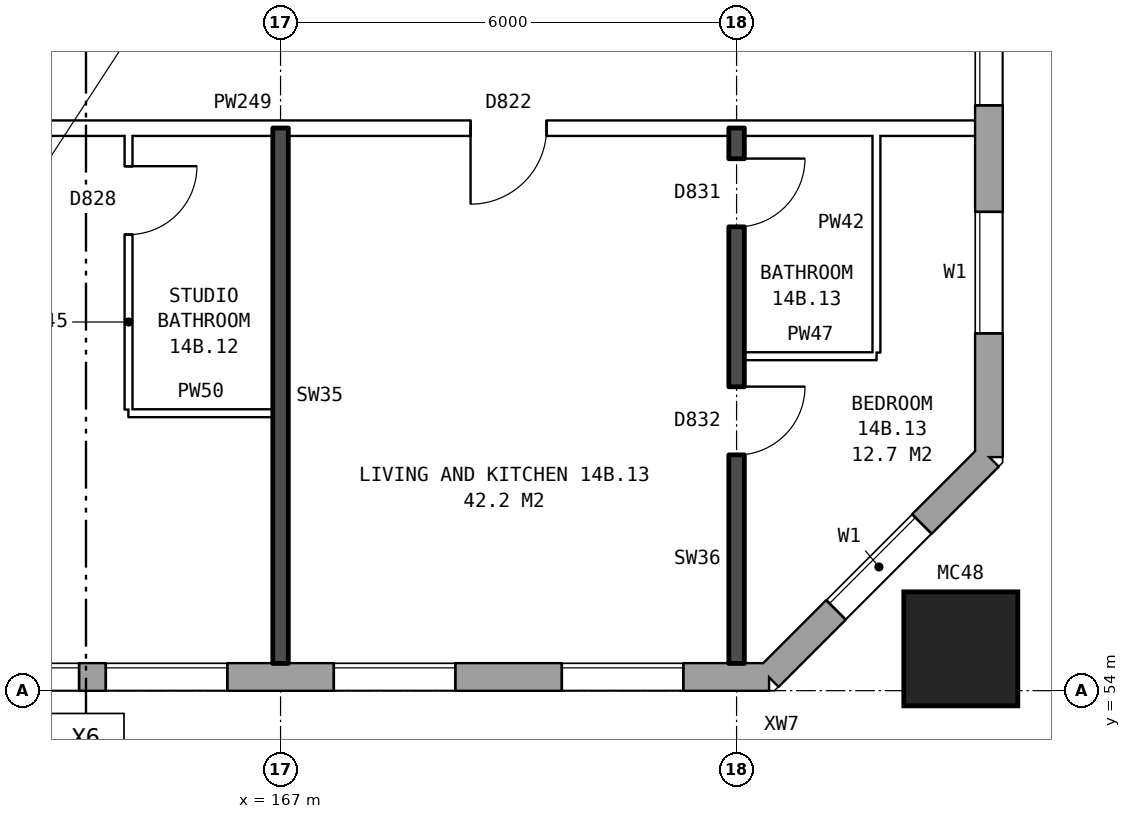
"""IFC4 building model, lengths in metres.
Left out: names, types, materials, properties, quantities, classifications, styles, units other than length and angle.
Written with IfcOpenShell. Run it as: python <this file> out.ifc"""

import sys

from ifc_helpers import new_model, si_unit, direction, frame, frame_2d, origin, origin_2d, place, context, subcontext, project, spatial, rectangle, hollow_rectangle, extrude, element, fill, save


model = new_model("IFC4")
c1 = context("Model", 3, precision=1e-05, world=origin(), true_north=direction((0.0, 1.0)))
c2 = subcontext(c1, "Body", "Model", "MODEL_VIEW")
j1 = project(units=[si_unit("LENGTHUNIT", "METRE"), si_unit("PLANEANGLEUNIT", "RADIAN")], contexts=[c1])
p1 = place(None, origin())
s1 = spatial("IfcSite", under=j1, at=p1, CompositionType="ELEMENT")
p2 = place(p1, origin())
s2 = spatial("IfcBuilding", under=s1, at=p2, CompositionType="ELEMENT")
p3 = place(p2, frame((0.0, 0.0, 53.6)))
s3 = spatial("IfcBuildingStorey", under=s2, at=p3, CompositionType="ELEMENT", Elevation=53.6)
p4 = place(p3, frame((175.95, 54.55, 0.0), z_axis=(0.0, 0.0, 1.0), x_axis=(1.0, 0.0, 0.0)))
e1 = element("IfcColumn", 1, at=p4, inside=s3, PredefinedType="COLUMN", context=c2, shape_type="SweptSolid", body=[
    extrude(hollow_rectangle(XDim=1.5, YDim=1.5, WallThickness=0.08, at=origin_2d()), origin(), (0.0, 0.0, 1.0), 3.1),
])
p5 = place(p3, frame((134.075, 54.18, 0.0), z_axis=(0.0, 0.0, 1.0), x_axis=(1.0, 0.0, 0.0)))
e2 = element("IfcWall", 2, at=p5, inside=s3, PredefinedType="STANDARD", context=c2, shape_type="SweptSolid", body=[
    extrude(rectangle(XDim=39.351, YDim=0.36, at=frame_2d((19.675, 0.0))), origin(), (0.0, 0.0, 1.0), 2.85),
])
p6 = place(p5, frame((0.625, 0.0, 0.8)))
e3 = element("IfcOpeningElement", 3, at=p6, cuts=e2, PredefinedType="OPENING", context=c2, shape_type="SweptSolid", body=[
    extrude(rectangle(XDim=1.6, YDim=1.8, at=frame_2d((0.8, 0.9))), frame((0.0, 0.19, 0.0), z_axis=(0.0, -1.0, 0.0), x_axis=(1.0, 0.0, 0.0)), (0.0, 0.0, 1.0), 0.38),
])
p7 = place(p5, frame((3.625, 0.0, 0.8)))
e4 = element("IfcOpeningElement", 4, at=p7, cuts=e2, PredefinedType="OPENING", context=c2, shape_type="SweptSolid", body=[
    extrude(rectangle(XDim=1.6, YDim=1.8, at=frame_2d((0.8, 0.9))), frame((0.0, 0.19, 0.0), z_axis=(0.0, -1.0, 0.0), x_axis=(1.0, 0.0, 0.0)), (0.0, 0.0, 1.0), 0.38),
])
p8 = place(p5, frame((6.625, 0.0, 0.8)))
e5 = element("IfcOpeningElement", 5, at=p8, cuts=e2, PredefinedType="OPENING", context=c2, shape_type="SweptSolid", body=[
    extrude(rectangle(XDim=1.6, YDim=1.8, at=frame_2d((0.8, 0.9))), frame((0.0, 0.19, 0.0), z_axis=(0.0, -1.0, 0.0), x_axis=(1.0, 0.0, 0.0)), (0.0, 0.0, 1.0), 0.38),
])
p9 = place(p5, frame((9.125, 0.0, 1.65)))
e6 = element("IfcOpeningElement", 6, at=p9, cuts=e2, PredefinedType="OPENING", context=c2, shape_type="SweptSolid", body=[
    extrude(rectangle(XDim=1.0, YDim=0.9, at=frame_2d((0.5, 0.45))), frame((0.0, 0.19, 0.0), z_axis=(0.0, -1.0, 0.0), x_axis=(1.0, 0.0, 0.0)), (0.0, 0.0, 1.0), 0.38),
])
p10 = place(p5, frame((12.625, 0.0, 0.8)))
e7 = element("IfcOpeningElement", 7, at=p10, cuts=e2, PredefinedType="OPENING", context=c2, shape_type="SweptSolid", body=[
    extrude(rectangle(XDim=1.6, YDim=1.8, at=frame_2d((0.8, 0.9))), frame((0.0, 0.19, 0.0), z_axis=(0.0, -1.0, 0.0), x_axis=(1.0, 0.0, 0.0)), (0.0, 0.0, 1.0), 0.38),
])
p11 = place(p5, frame((15.625, 0.0, 0.8)))
e8 = element("IfcOpeningElement", 8, at=p11, cuts=e2, PredefinedType="OPENING", context=c2, shape_type="SweptSolid", body=[
    extrude(rectangle(XDim=1.6, YDim=1.8, at=frame_2d((0.8, 0.9))), frame((0.0, 0.19, 0.0), z_axis=(0.0, -1.0, 0.0), x_axis=(1.0, 0.0, 0.0)), (0.0, 0.0, 1.0), 0.38),
])
p12 = place(p5, frame((18.625, 0.0, 0.8)))
e9 = element("IfcOpeningElement", 9, at=p12, cuts=e2, PredefinedType="OPENING", context=c2, shape_type="SweptSolid", body=[
    extrude(rectangle(XDim=1.6, YDim=1.8, at=frame_2d((0.8, 0.9))), frame((0.0, 0.19, 0.0), z_axis=(0.0, -1.0, 0.0), x_axis=(1.0, 0.0, 0.0)), (0.0, 0.0, 1.0), 0.38),
])
p13 = place(p5, frame((21.625, 0.0, 0.8)))
e10 = element("IfcOpeningElement", 10, at=p13, cuts=e2, PredefinedType="OPENING", context=c2, shape_type="SweptSolid", body=[
    extrude(rectangle(XDim=1.6, YDim=1.8, at=frame_2d((0.8, 0.9))), frame((0.0, 0.19, 0.0), z_axis=(0.0, -1.0, 0.0), x_axis=(1.0, 0.0, 0.0)), (0.0, 0.0, 1.0), 0.38),
])
p14 = place(p5, frame((24.625, 0.0, 0.8)))
e11 = element("IfcOpeningElement", 11, at=p14, cuts=e2, PredefinedType="OPENING", context=c2, shape_type="SweptSolid", body=[
    extrude(rectangle(XDim=1.6, YDim=1.8, at=frame_2d((0.8, 0.9))), frame((0.0, 0.19, 0.0), z_axis=(0.0, -1.0, 0.0), x_axis=(1.0, 0.0, 0.0)), (0.0, 0.0, 1.0), 0.38),
])
p15 = place(p5, frame((27.125, 0.0, 0.8)))
e12 = element("IfcOpeningElement", 12, at=p15, cuts=e2, PredefinedType="OPENING", context=c2, shape_type="SweptSolid", body=[
    extrude(rectangle(XDim=0.6, YDim=0.9, at=frame_2d((0.3, 0.45))), frame((0.0, 0.19, 0.0), z_axis=(0.0, -1.0, 0.0), x_axis=(1.0, 0.0, 0.0)), (0.0, 0.0, 1.0), 0.38),
])
p16 = place(p5, frame((30.625, 0.0, 0.8)))
e13 = element("IfcOpeningElement", 13, at=p16, cuts=e2, PredefinedType="OPENING", context=c2, shape_type="SweptSolid", body=[
    extrude(rectangle(XDim=1.6, YDim=1.8, at=frame_2d((0.8, 0.9))), frame((0.0, 0.19, 0.0), z_axis=(0.0, -1.0, 0.0), x_axis=(1.0, 0.0, 0.0)), (0.0, 0.0, 1.0), 0.38),
])
p17 = place(p5, frame((33.625, 0.0, 0.8)))
e14 = element("IfcOpeningElement", 14, at=p17, cuts=e2, PredefinedType="OPENING", context=c2, shape_type="SweptSolid", body=[
    extrude(rectangle(XDim=1.6, YDim=1.8, at=frame_2d((0.8, 0.9))), frame((0.0, 0.19, 0.0), z_axis=(0.0, -1.0, 0.0), x_axis=(1.0, 0.0, 0.0)), (0.0, 0.0, 1.0), 0.38),
])
p18 = place(p5, frame((36.625, 0.0, 0.8)))
e15 = element("IfcOpeningElement", 15, at=p18, cuts=e2, PredefinedType="OPENING", context=c2, shape_type="SweptSolid", body=[
    extrude(rectangle(XDim=1.6, YDim=1.8, at=frame_2d((0.8, 0.9))), frame((0.0, 0.19, 0.0), z_axis=(0.0, -1.0, 0.0), x_axis=(1.0, 0.0, 0.0)), (0.0, 0.0, 1.0), 0.38),
])
p19 = place(p5, frame((10.725, 0.0, 0.15)))
e16 = element("IfcOpeningElement", 16, at=p19, cuts=e2, PredefinedType="OPENING", context=c2, shape_type="SweptSolid", body=[
    extrude(rectangle(XDim=1.0, YDim=0.9, at=frame_2d((0.5, 0.45))), frame((0.0, 0.19, 0.0), z_axis=(0.0, -1.0, 0.0), x_axis=(1.0, 0.0, 0.0)), (0.0, 0.0, 1.0), 0.38),
])
p20 = place(p5, frame((29.075, 0.0, 1.7)))
e17 = element("IfcOpeningElement", 17, at=p20, cuts=e2, PredefinedType="OPENING", context=c2, shape_type="SweptSolid", body=[
    extrude(rectangle(XDim=1.2, YDim=0.9, at=frame_2d((0.6, 0.45))), frame((0.0, 0.19, 0.0), z_axis=(0.0, -1.0, 0.0), x_axis=(1.0, 0.0, 0.0)), (0.0, 0.0, 1.0), 0.38),
])
p21 = place(p3, frame((173.425, 54.18, 0.0), z_axis=(0.0, 0.0, 1.0), x_axis=(0.707106781187, 0.707106781187, 0.0)))
e18 = element("IfcWall", 18, at=p21, inside=s3, PredefinedType="STANDARD", context=c2, shape_type="SweptSolid", body=[
    extrude(rectangle(XDim=4.094, YDim=0.36, at=frame_2d((2.047, 0.0))), origin(), (0.0, 0.0, 1.0), 2.85),
])
p22 = place(p21, frame((1.247, 0.0, 0.8)))
e19 = element("IfcOpeningElement", 19, at=p22, cuts=e18, PredefinedType="OPENING", context=c2, shape_type="SweptSolid", body=[
    extrude(rectangle(XDim=1.6, YDim=1.8, at=frame_2d((0.8, 0.9))), frame((0.0, 0.19, 0.0), z_axis=(0.0, -1.0, 0.0), x_axis=(1.0, 0.0, 0.0)), (0.0, 0.0, 1.0), 0.38),
])
p23 = place(p3, frame((176.32, 57.075, 0.0), z_axis=(0.0, 0.0, 1.0), x_axis=(0.0, 1.0, 0.0)))
e20 = element("IfcWall", 20, at=p23, inside=s3, PredefinedType="STANDARD", context=c2, shape_type="SweptSolid", body=[
    extrude(rectangle(XDim=25.851, YDim=0.36, at=frame_2d((12.925, 0.0))), origin(), (0.0, 0.0, 1.0), 2.85),
])
p24 = place(p23, frame((1.625, 0.0, 0.8)))
e21 = element("IfcOpeningElement", 21, at=p24, cuts=e20, PredefinedType="OPENING", context=c2, shape_type="SweptSolid", body=[
    extrude(rectangle(XDim=1.6, YDim=1.8, at=frame_2d((0.8, 0.9))), frame((0.0, 0.19, 0.0), z_axis=(0.0, -1.0, 0.0), x_axis=(1.0, 0.0, 0.0)), (0.0, 0.0, 1.0), 0.38),
])
p25 = place(p23, frame((4.625, 0.0, 0.8)))
e22 = element("IfcOpeningElement", 22, at=p25, cuts=e20, PredefinedType="OPENING", context=c2, shape_type="SweptSolid", body=[
    extrude(rectangle(XDim=1.6, YDim=1.8, at=frame_2d((0.8, 0.9))), frame((0.0, 0.19, 0.0), z_axis=(0.0, -1.0, 0.0), x_axis=(1.0, 0.0, 0.0)), (0.0, 0.0, 1.0), 0.38),
])
p26 = place(p23, frame((6.525, 0.0, 0.8)))
e23 = element("IfcOpeningElement", 23, at=p26, cuts=e20, PredefinedType="OPENING", context=c2, shape_type="SweptSolid", body=[
    extrude(rectangle(XDim=1.0, YDim=1.8, at=frame_2d((0.5, 0.9))), frame((0.0, 0.19, 0.0), z_axis=(0.0, -1.0, 0.0), x_axis=(1.0, 0.0, 0.0)), (0.0, 0.0, 1.0), 0.38),
])
p27 = place(p23, frame((7.825, 0.0, 0.8)))
e24 = element("IfcOpeningElement", 24, at=p27, cuts=e20, PredefinedType="OPENING", context=c2, shape_type="SweptSolid", body=[
    extrude(rectangle(XDim=1.2, YDim=0.9, at=frame_2d((0.6, 0.45))), frame((0.0, 0.19, 0.0), z_axis=(0.0, -1.0, 0.0), x_axis=(1.0, 0.0, 0.0)), (0.0, 0.0, 1.0), 0.38),
])
p28 = place(p23, frame((10.275, 0.0, 1.7)))
e25 = element("IfcOpeningElement", 25, at=p28, cuts=e20, PredefinedType="OPENING", context=c2, shape_type="SweptSolid", body=[
    extrude(rectangle(XDim=0.8, YDim=0.9, at=frame_2d((0.4, 0.45))), frame((0.0, 0.19, 0.0), z_axis=(0.0, -1.0, 0.0), x_axis=(1.0, 0.0, 0.0)), (0.0, 0.0, 1.0), 0.38),
])
p29 = place(p23, frame((11.375, 0.0, 1.1)))
e26 = element("IfcOpeningElement", 26, at=p29, cuts=e20, PredefinedType="OPENING", context=c2, shape_type="SweptSolid", body=[
    extrude(rectangle(XDim=0.6, YDim=1.5, at=frame_2d((0.3, 0.75))), frame((0.0, 0.19, 0.0), z_axis=(0.0, -1.0, 0.0), x_axis=(1.0, 0.0, 0.0)), (0.0, 0.0, 1.0), 0.38),
])
p30 = place(p23, frame((19.625, 0.0, 0.8)))
e27 = element("IfcOpeningElement", 27, at=p30, cuts=e20, PredefinedType="OPENING", context=c2, shape_type="SweptSolid", body=[
    extrude(rectangle(XDim=1.6, YDim=1.8, at=frame_2d((0.8, 0.9))), frame((0.0, 0.19, 0.0), z_axis=(0.0, -1.0, 0.0), x_axis=(1.0, 0.0, 0.0)), (0.0, 0.0, 1.0), 0.38),
])
p31 = place(p23, frame((22.625, 0.0, 0.8)))
e28 = element("IfcOpeningElement", 28, at=p31, cuts=e20, PredefinedType="OPENING", context=c2, shape_type="SweptSolid", body=[
    extrude(rectangle(XDim=1.6, YDim=1.8, at=frame_2d((0.8, 0.9))), frame((0.0, 0.19, 0.0), z_axis=(0.0, -1.0, 0.0), x_axis=(1.0, 0.0, 0.0)), (0.0, 0.0, 1.0), 0.38),
])
p32 = place(p23, frame((12.275, 0.0, 0.8)))
e29 = element("IfcOpeningElement", 29, at=p32, cuts=e20, PredefinedType="OPENING", context=c2, shape_type="SweptSolid", body=[
    extrude(rectangle(XDim=1.6, YDim=1.8, at=frame_2d((0.8, 0.9))), frame((0.0, 0.19, 0.0), z_axis=(0.0, -1.0, 0.0), x_axis=(1.0, 0.0, 0.0)), (0.0, 0.0, 1.0), 0.38),
])
p33 = place(p23, frame((14.175, 0.0, 1.7)))
e30 = element("IfcOpeningElement", 30, at=p33, cuts=e20, PredefinedType="OPENING", context=c2, shape_type="SweptSolid", body=[
    extrude(rectangle(XDim=1.4, YDim=0.9, at=frame_2d((0.7, 0.45))), frame((0.0, 0.19, 0.0), z_axis=(0.0, -1.0, 0.0), x_axis=(1.0, 0.0, 0.0)), (0.0, 0.0, 1.0), 0.38),
])
p34 = place(p23, frame((16.725, 0.0, 0.8)))
e31 = element("IfcOpeningElement", 31, at=p34, cuts=e20, PredefinedType="OPENING", context=c2, shape_type="SweptSolid", body=[
    extrude(rectangle(XDim=1.2, YDim=0.9, at=frame_2d((0.6, 0.45))), frame((0.0, 0.19, 0.0), z_axis=(0.0, -1.0, 0.0), x_axis=(1.0, 0.0, 0.0)), (0.0, 0.0, 1.0), 0.38),
])
p35 = place(p23, frame((18.275, 0.0, 0.8)))
e32 = element("IfcOpeningElement", 32, at=p35, cuts=e20, PredefinedType="OPENING", context=c2, shape_type="SweptSolid", body=[
    extrude(rectangle(XDim=1.0, YDim=1.8, at=frame_2d((0.5, 0.9))), frame((0.0, 0.19, 0.0), z_axis=(0.0, -1.0, 0.0), x_axis=(1.0, 0.0, 0.0)), (0.0, 0.0, 1.0), 0.38),
])
p36 = place(p3, frame((165.0, 57.65, 0.0), z_axis=(0.0, 0.0, 1.0), x_axis=(1.0, 0.0, 0.0)))
e33 = element("IfcWall", 33, at=p36, inside=s3, PredefinedType="PARTITIONING", context=c2, shape_type="SweptSolid", body=[
    extrude(rectangle(XDim=1.9, YDim=0.1, at=frame_2d((0.95, 0.0))), origin(), (0.0, 0.0, 1.0), 2.85),
])
p37 = place(p3, frame((173.1, 58.4, 0.0), z_axis=(0.0, 0.0, 1.0), x_axis=(1.0, 0.0, 0.0)))
e34 = element("IfcWall", 34, at=p37, inside=s3, PredefinedType="PARTITIONING", context=c2, shape_type="SweptSolid", body=[
    extrude(rectangle(XDim=1.74, YDim=0.1, at=frame_2d((0.87, 0.0))), origin(), (0.0, 0.0, 1.0), 2.85),
])
p38 = place(p3, frame((155.1, 61.4, 0.0), z_axis=(0.0, 0.0, 1.0), x_axis=(1.0, 0.0, 0.0)))
e35 = element("IfcWall", 35, at=p38, inside=s3, PredefinedType="PARTITIONING", context=c2, shape_type="SweptSolid", body=[
    extrude(rectangle(XDim=21.04, YDim=0.2, at=frame_2d((10.52, 0.0))), origin(), (0.0, 0.0, 1.0), 2.85),
])
p39 = place(p38, frame((1.45, 0.0, 0.0)))
e36 = element("IfcOpeningElement", 36, at=p39, cuts=e35, PredefinedType="OPENING", context=c2, shape_type="SweptSolid", body=[
    extrude(rectangle(XDim=1.0, YDim=2.1, at=frame_2d((0.5, 1.05))), frame((0.0, 0.11, 0.0), z_axis=(0.0, -1.0, 0.0), x_axis=(1.0, 0.0, 0.0)), (0.0, 0.0, 1.0), 0.22),
])
p40 = place(p38, frame((7.4, 0.0, 0.0)))
e37 = element("IfcOpeningElement", 37, at=p40, cuts=e35, PredefinedType="OPENING", context=c2, shape_type="SweptSolid", body=[
    extrude(rectangle(XDim=1.0, YDim=2.1, at=frame_2d((0.5, 1.05))), frame((0.0, 0.11, 0.0), z_axis=(0.0, -1.0, 0.0), x_axis=(1.0, 0.0, 0.0)), (0.0, 0.0, 1.0), 0.22),
])
p41 = place(p38, frame((14.4, 0.0, 0.0)))
e38 = element("IfcOpeningElement", 38, at=p41, cuts=e35, PredefinedType="OPENING", context=c2, shape_type="SweptSolid", body=[
    extrude(rectangle(XDim=1.0, YDim=2.1, at=frame_2d((0.5, 1.05))), frame((0.0, 0.11, 0.0), z_axis=(0.0, -1.0, 0.0), x_axis=(1.0, 0.0, 0.0)), (0.0, 0.0, 1.0), 0.22),
])
p42 = place(p3, frame((165.0, 57.7, 0.0), z_axis=(0.0, 0.0, 1.0), x_axis=(0.0, 1.0, 0.0)))
e39 = element("IfcWall", 39, at=p42, inside=s3, PredefinedType="PARTITIONING", context=c2, shape_type="SweptSolid", body=[
    extrude(rectangle(XDim=3.6, YDim=0.1, at=frame_2d((1.8, 0.0))), origin(), (0.0, 0.0, 1.0), 2.85),
])
p43 = place(p42, frame((2.3, 0.0, 0.0)))
e40 = element("IfcOpeningElement", 40, at=p43, cuts=e39, PredefinedType="OPENING", context=c2, shape_type="SweptSolid", body=[
    extrude(rectangle(XDim=0.9, YDim=2.1, at=frame_2d((0.45, 1.05))), frame((0.0, 0.06, 0.0), z_axis=(0.0, -1.0, 0.0), x_axis=(1.0, 0.0, 0.0)), (0.0, 0.0, 1.0), 0.12),
])
p44 = place(p3, frame((167.0, 54.36, 0.0), z_axis=(0.0, 0.0, 1.0), x_axis=(0.0, 1.0, 0.0)))
e41 = element("IfcWall", 41, at=p44, inside=s3, PredefinedType="SOLIDWALL", context=c2, shape_type="SweptSolid", body=[
    extrude(rectangle(XDim=7.04, YDim=0.2, at=frame_2d((3.52, 0.0))), origin(), (0.0, 0.0, 1.0), 2.85),
])
p45 = place(p3, frame((173.0, 54.36, 0.0), z_axis=(0.0, 0.0, 1.0), x_axis=(0.0, 1.0, 0.0)))
e42 = element("IfcWall", 42, at=p45, inside=s3, PredefinedType="SOLIDWALL", context=c2, shape_type="SweptSolid", body=[
    extrude(rectangle(XDim=7.04, YDim=0.2, at=frame_2d((3.52, 0.0))), origin(), (0.0, 0.0, 1.0), 2.85),
])
p46 = place(p45, frame((2.74, 0.0, 0.0)))
e43 = element("IfcOpeningElement", 43, at=p46, cuts=e42, PredefinedType="OPENING", context=c2, shape_type="SweptSolid", body=[
    extrude(rectangle(XDim=0.9, YDim=2.1, at=frame_2d((0.45, 1.05))), frame((0.0, 0.11, 0.0), z_axis=(0.0, -1.0, 0.0), x_axis=(1.0, 0.0, 0.0)), (0.0, 0.0, 1.0), 0.22),
])
p47 = place(p45, frame((5.74, 0.0, 0.0)))
e44 = element("IfcOpeningElement", 44, at=p47, cuts=e42, PredefinedType="OPENING", context=c2, shape_type="SweptSolid", body=[
    extrude(rectangle(XDim=0.9, YDim=2.1, at=frame_2d((0.45, 1.05))), frame((0.0, 0.11, 0.0), z_axis=(0.0, -1.0, 0.0), x_axis=(1.0, 0.0, 0.0)), (0.0, 0.0, 1.0), 0.22),
])
p48 = place(p3, frame((174.84, 58.45, 0.0), z_axis=(0.0, 0.0, 1.0), x_axis=(0.0, 1.0, 0.0)))
e45 = element("IfcWall", 45, at=p48, inside=s3, PredefinedType="PARTITIONING", context=c2, shape_type="SweptSolid", body=[
    extrude(rectangle(XDim=2.85, YDim=0.1, at=frame_2d((1.425, 0.0))), origin(), (0.0, 0.0, 1.0), 2.85),
])
p49 = place(p16, origin())
e46 = element("IfcWindow", 46, at=p49, inside=s3, PartitioningType="SINGLE_PANEL", PredefinedType="WINDOW", context=c2, shape_type="SweptSolid", body=[
    extrude(rectangle(XDim=1.6, YDim=1.8, at=frame_2d((0.8, 0.9))), frame((0.0, 0.15, 0.0), z_axis=(0.0, -1.0, 0.0), x_axis=(1.0, 0.0, 0.0)), (0.0, 0.0, 1.0), 0.06),
])
fill(e13, e46)
p50 = place(p17, origin())
e47 = element("IfcWindow", 47, at=p50, inside=s3, PartitioningType="SINGLE_PANEL", PredefinedType="WINDOW", context=c2, shape_type="SweptSolid", body=[
    extrude(rectangle(XDim=1.6, YDim=1.8, at=frame_2d((0.8, 0.9))), frame((0.0, 0.15, 0.0), z_axis=(0.0, -1.0, 0.0), x_axis=(1.0, 0.0, 0.0)), (0.0, 0.0, 1.0), 0.06),
])
fill(e14, e47)
p51 = place(p18, origin())
e48 = element("IfcWindow", 48, at=p51, inside=s3, PartitioningType="SINGLE_PANEL", PredefinedType="WINDOW", context=c2, shape_type="SweptSolid", body=[
    extrude(rectangle(XDim=1.6, YDim=1.8, at=frame_2d((0.8, 0.9))), frame((0.0, 0.15, 0.0), z_axis=(0.0, -1.0, 0.0), x_axis=(1.0, 0.0, 0.0)), (0.0, 0.0, 1.0), 0.06),
])
fill(e15, e48)
p52 = place(p22, origin())
e49 = element("IfcWindow", 49, at=p52, inside=s3, PartitioningType="SINGLE_PANEL", PredefinedType="WINDOW", context=c2, shape_type="SweptSolid", body=[
    extrude(rectangle(XDim=1.6, YDim=1.8, at=frame_2d((0.8, 0.9))), frame((0.0, 0.15, 0.0), z_axis=(0.0, -1.0, 0.0), x_axis=(1.0, 0.0, 0.0)), (0.0, 0.0, 1.0), 0.06),
])
fill(e19, e49)
p53 = place(p24, origin())
e50 = element("IfcWindow", 50, at=p53, inside=s3, PartitioningType="SINGLE_PANEL", PredefinedType="WINDOW", context=c2, shape_type="SweptSolid", body=[
    extrude(rectangle(XDim=1.6, YDim=1.8, at=frame_2d((0.8, 0.9))), frame((0.0, 0.15, 0.0), z_axis=(0.0, -1.0, 0.0), x_axis=(1.0, 0.0, 0.0)), (0.0, 0.0, 1.0), 0.06),
])
fill(e21, e50)
p54 = place(p25, origin())
e51 = element("IfcWindow", 51, at=p54, inside=s3, PartitioningType="SINGLE_PANEL", PredefinedType="WINDOW", context=c2, shape_type="SweptSolid", body=[
    extrude(rectangle(XDim=1.6, YDim=1.8, at=frame_2d((0.8, 0.9))), frame((0.0, 0.15, 0.0), z_axis=(0.0, -1.0, 0.0), x_axis=(1.0, 0.0, 0.0)), (0.0, 0.0, 1.0), 0.06),
])
fill(e22, e51)
p55 = place(p43, frame((0.9, 0.0, 0.0), z_axis=(0.0, 0.0, 1.0), x_axis=(-1.0, 0.0, 0.0)))
e52 = element("IfcDoor", 52, at=p55, inside=s3, OperationType="SINGLE_SWING_LEFT", PredefinedType="DOOR", context=c2, shape_type="SweptSolid", body=[
    extrude(rectangle(XDim=0.9, YDim=2.1, at=frame_2d((0.45, 1.05))), frame((0.0, 0.025, 0.0), z_axis=(0.0, -1.0, 0.0), x_axis=(1.0, 0.0, 0.0)), (0.0, 0.0, 1.0), 0.05),
])
fill(e40, e52)
p56 = place(p46, frame((0.9, 0.0, 0.0), z_axis=(0.0, 0.0, 1.0), x_axis=(-1.0, 0.0, 0.0)))
e53 = element("IfcDoor", 53, at=p56, inside=s3, OperationType="SINGLE_SWING_LEFT", PredefinedType="DOOR", context=c2, shape_type="SweptSolid", body=[
    extrude(rectangle(XDim=0.9, YDim=2.1, at=frame_2d((0.45, 1.05))), frame((0.0, 0.025, 0.0), z_axis=(0.0, -1.0, 0.0), x_axis=(1.0, 0.0, 0.0)), (0.0, 0.0, 1.0), 0.05),
])
fill(e43, e53)
p57 = place(p41, frame((1.0, 0.0, 0.0), z_axis=(0.0, 0.0, 1.0), x_axis=(-1.0, 0.0, 0.0)))
e54 = element("IfcDoor", 54, at=p57, inside=s3, OperationType="SINGLE_SWING_RIGHT", PredefinedType="DOOR", context=c2, shape_type="SweptSolid", body=[
    extrude(rectangle(XDim=1.0, YDim=2.1, at=frame_2d((0.5, 1.05))), frame((0.0, 0.025, 0.0), z_axis=(0.0, -1.0, 0.0), x_axis=(1.0, 0.0, 0.0)), (0.0, 0.0, 1.0), 0.05),
])
fill(e38, e54)
p58 = place(p47, frame((0.9, 0.0, 0.0), z_axis=(0.0, 0.0, 1.0), x_axis=(-1.0, 0.0, 0.0)))
e55 = element("IfcDoor", 55, at=p58, inside=s3, OperationType="SINGLE_SWING_LEFT", PredefinedType="DOOR", context=c2, shape_type="SweptSolid", body=[
    extrude(rectangle(XDim=0.9, YDim=2.1, at=frame_2d((0.45, 1.05))), frame((0.0, 0.025, 0.0), z_axis=(0.0, -1.0, 0.0), x_axis=(1.0, 0.0, 0.0)), (0.0, 0.0, 1.0), 0.05),
])
fill(e44, e55)
p59 = place(p20, origin())
e56 = element("IfcWindow", 56, at=p59, inside=s3, PartitioningType="SINGLE_PANEL", PredefinedType="WINDOW", context=c2, shape_type="SweptSolid", body=[
    extrude(rectangle(XDim=1.2, YDim=0.9, at=frame_2d((0.6, 0.45))), frame((0.0, 0.15, 0.0), z_axis=(0.0, -1.0, 0.0), x_axis=(1.0, 0.0, 0.0)), (0.0, 0.0, 1.0), 0.06),
])
fill(e17, e56)
save(model, sys.argv[1])
